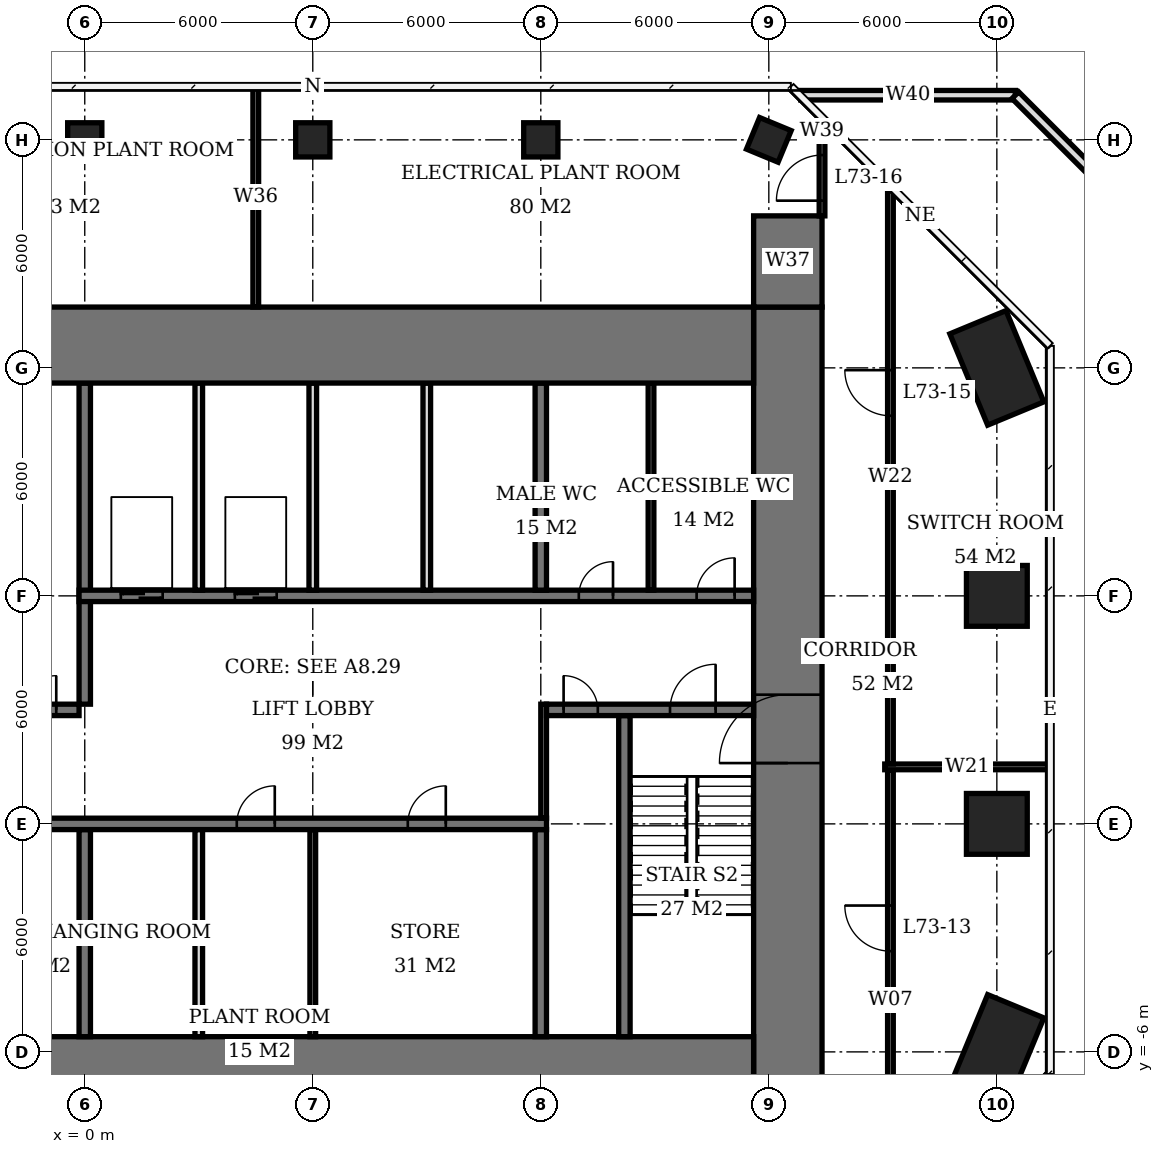
"""IFC4 building model, lengths in metres.
Left out: names, types, materials, properties, quantities, classifications, styles, units other than length and angle.
Written with IfcOpenShell. Run it as: python <this file> out.ifc"""

import sys

from ifc_helpers import new_model, si_unit, direction, frame, frame_2d, origin, origin_2d, place, context, subcontext, project, spatial, rectangle, extrude, element, fill, save


model = new_model("IFC4")
c1 = context("Model", 3, precision=1e-05, world=origin(), true_north=direction((0.0, 1.0)))
c2 = subcontext(c1, "Body", "Model", "MODEL_VIEW")
j1 = project(units=[si_unit("LENGTHUNIT", "METRE"), si_unit("PLANEANGLEUNIT", "RADIAN")], contexts=[c1])
p1 = place(None, origin())
s1 = spatial("IfcSite", under=j1, at=p1, CompositionType="ELEMENT")
p2 = place(p1, origin())
s2 = spatial("IfcBuilding", under=s1, at=p2, CompositionType="ELEMENT")
p3 = place(p2, frame((0.0, 0.0, 295.7)))
s3 = spatial("IfcBuildingStorey", under=s2, at=p3, CompositionType="ELEMENT", Elevation=295.7)
for number, where, z_axis, x_axis in (
    (1, (0.0, 18.0, 0.0), (0.0, 0.0, 1.0), (1.0, 0.0, 0.0)),
    (2, (6.0, 18.0, 0.0), (0.0, 0.0, 1.0), (1.0, 0.0, 0.0)),
    (3, (12.0, 18.0, 0.0), (0.0, 0.0, 1.0), (1.0, 0.0, 0.0)),
    (4, (18.0, 18.0, 0.0), (0.0, 0.0, 1.0), (0.924, -0.383, 0.0)),
):
    element("IfcColumn", number, at=place(p3, frame(where, z_axis=z_axis, x_axis=x_axis)), inside=s3, PredefinedType="COLUMN", context=c2, shape_type="SweptSolid", body=[
        extrude(rectangle(XDim=0.9, YDim=0.9, at=origin_2d()), origin(), (0.0, 0.0, 1.0), 5.0),
    ])
p4 = place(p3, frame((24.0, -6.0, 0.0), z_axis=(0.0, 0.0, 1.0), x_axis=(-0.382683432365, -0.923879532511, 0.0)))
e5 = element("IfcColumn", 5, at=p4, inside=s3, PredefinedType="COLUMN", context=c2, shape_type="SweptSolid", body=[
    extrude(rectangle(XDim=2.6, YDim=1.6, at=origin_2d()), origin(), (0.0, 0.0, 1.0), 5.0),
])
for number, where, z_axis, x_axis in (
    (6, (24.0, 0.0, 0.0), (0.0, 0.0, 1.0), (1.0, 0.0, 0.0)),
    (7, (24.0, 6.0, 0.0), (0.0, 0.0, 1.0), (1.0, 0.0, 0.0)),
):
    element("IfcColumn", number, at=place(p3, frame(where, z_axis=z_axis, x_axis=x_axis)), inside=s3, PredefinedType="COLUMN", context=c2, shape_type="SweptSolid", body=[
        extrude(rectangle(XDim=1.6, YDim=1.6, at=origin_2d()), origin(), (0.0, 0.0, 1.0), 5.0),
    ])
p5 = place(p3, frame((24.0, 12.0, 0.0), z_axis=(0.0, 0.0, 1.0), x_axis=(0.382683432365, -0.923879532511, 0.0)))
e8 = element("IfcColumn", 8, at=p5, inside=s3, PredefinedType="COLUMN", context=c2, shape_type="SweptSolid", body=[
    extrude(rectangle(XDim=2.6, YDim=1.6, at=origin_2d()), origin(), (0.0, 0.0, 1.0), 5.0),
])
for number, where, z_axis, x_axis in (
    (9, (-5.6, -6.6, 0.0), (0.0, 0.0, 1.0), (1.0, 0.0, 0.0)),
    (10, (-5.6, 12.6, 0.0), (0.0, 0.0, 1.0), (1.0, 0.0, 0.0)),
):
    element("IfcWall", number, at=place(p3, frame(where, z_axis=z_axis, x_axis=x_axis)), inside=s3, PredefinedType="SHEAR", context=c2, shape_type="SweptSolid", body=[
        extrude(rectangle(XDim=23.2, YDim=2.0, at=frame_2d((11.6, 0.0))), origin(), (0.0, 0.0, 1.0), 5.0),
    ])
p6 = place(p3, frame((18.5, -7.6, 0.0), z_axis=(0.0, 0.0, 1.0), x_axis=(0.0, 1.0, 0.0)))
e11 = element("IfcWall", 11, at=p6, inside=s3, PredefinedType="SHEAR", context=c2, shape_type="SweptSolid", body=[
    extrude(rectangle(XDim=21.2, YDim=1.8, at=frame_2d((10.6, 0.0))), origin(), (0.0, 0.0, 1.0), 5.0),
])
p7 = place(p6, frame((9.2, 0.0, 0.0)))
e12 = element("IfcOpeningElement", 12, at=p7, cuts=e11, PredefinedType="OPENING", context=c2, shape_type="SweptSolid", body=[
    extrude(rectangle(XDim=1.8, YDim=2.4, at=frame_2d((0.9, 1.2))), frame((0.0, 0.91, 0.0), z_axis=(0.0, -1.0, 0.0), x_axis=(1.0, 0.0, 0.0)), (0.0, 0.0, 1.0), 1.82),
])
p8 = place(p3, frame((18.5, 13.6, 0.0), z_axis=(0.0, 0.0, 1.0), x_axis=(0.0, 1.0, 0.0)))
e13 = element("IfcWall", 13, at=p8, inside=s3, PredefinedType="SHEAR", context=c2, shape_type="SweptSolid", body=[
    extrude(rectangle(XDim=2.4, YDim=1.8, at=frame_2d((1.2, 0.0))), origin(), (0.0, 0.0, 1.0), 5.0),
])
p9 = place(p3, frame((-5.6, 0.0, 0.0), z_axis=(0.0, 0.0, 1.0), x_axis=(1.0, 0.0, 0.0)))
e14 = element("IfcWall", 14, at=p9, inside=s3, PredefinedType="SHEAR", context=c2, shape_type="SweptSolid", body=[
    extrude(rectangle(XDim=17.75, YDim=0.3, at=frame_2d((8.875, 0.0))), origin(), (0.0, 0.0, 1.0), 5.0),
])
p10 = place(p9, frame((0.6, 0.0, 0.0)))
e15 = element("IfcOpeningElement", 15, at=p10, cuts=e14, PredefinedType="OPENING", context=c2, shape_type="SweptSolid", body=[
    extrude(rectangle(XDim=0.9, YDim=2.1, at=frame_2d((0.45, 1.05))), frame((0.0, 0.16, 0.0), z_axis=(0.0, -1.0, 0.0), x_axis=(1.0, 0.0, 0.0)), (0.0, 0.0, 1.0), 0.32),
])
p11 = place(p9, frame((3.7, 0.0, 0.0)))
e16 = element("IfcOpeningElement", 16, at=p11, cuts=e14, PredefinedType="OPENING", context=c2, shape_type="SweptSolid", body=[
    extrude(rectangle(XDim=0.9, YDim=2.1, at=frame_2d((0.45, 1.05))), frame((0.0, 0.16, 0.0), z_axis=(0.0, -1.0, 0.0), x_axis=(1.0, 0.0, 0.0)), (0.0, 0.0, 1.0), 0.32),
])
p12 = place(p9, frame((9.6, 0.0, 0.0)))
e17 = element("IfcOpeningElement", 17, at=p12, cuts=e14, PredefinedType="OPENING", context=c2, shape_type="SweptSolid", body=[
    extrude(rectangle(XDim=1.0, YDim=2.1, at=frame_2d((0.5, 1.05))), frame((0.0, 0.16, 0.0), z_axis=(0.0, -1.0, 0.0), x_axis=(1.0, 0.0, 0.0)), (0.0, 0.0, 1.0), 0.32),
])
p13 = place(p9, frame((14.1, 0.0, 0.0)))
e18 = element("IfcOpeningElement", 18, at=p13, cuts=e14, PredefinedType="OPENING", context=c2, shape_type="SweptSolid", body=[
    extrude(rectangle(XDim=1.0, YDim=2.1, at=frame_2d((0.5, 1.05))), frame((0.0, 0.16, 0.0), z_axis=(0.0, -1.0, 0.0), x_axis=(1.0, 0.0, 0.0)), (0.0, 0.0, 1.0), 0.32),
])
p14 = place(p3, frame((-5.6, 3.0, 0.0), z_axis=(0.0, 0.0, 1.0), x_axis=(1.0, 0.0, 0.0)))
e19 = element("IfcWall", 19, at=p14, inside=s3, PredefinedType="SHEAR", context=c2, shape_type="SweptSolid", body=[
    extrude(rectangle(XDim=5.45, YDim=0.3, at=frame_2d((2.725, 0.0))), origin(), (0.0, 0.0, 1.0), 5.0),
])
p15 = place(p14, frame((0.4, 0.0, 0.0)))
e20 = element("IfcOpeningElement", 20, at=p15, cuts=e19, PredefinedType="OPENING", context=c2, shape_type="SweptSolid", body=[
    extrude(rectangle(XDim=1.2, YDim=2.1, at=frame_2d((0.6, 1.05))), frame((0.0, 0.16, 0.0), z_axis=(0.0, -1.0, 0.0), x_axis=(1.0, 0.0, 0.0)), (0.0, 0.0, 1.0), 0.32),
])
p16 = place(p14, frame((3.95, 0.0, 0.0)))
e21 = element("IfcOpeningElement", 21, at=p16, cuts=e19, PredefinedType="OPENING", context=c2, shape_type="SweptSolid", body=[
    extrude(rectangle(XDim=0.9, YDim=2.1, at=frame_2d((0.45, 1.05))), frame((0.0, 0.16, 0.0), z_axis=(0.0, -1.0, 0.0), x_axis=(1.0, 0.0, 0.0)), (0.0, 0.0, 1.0), 0.32),
])
p17 = place(p3, frame((12.15, 3.0, 0.0), z_axis=(0.0, 0.0, 1.0), x_axis=(1.0, 0.0, 0.0)))
e22 = element("IfcWall", 22, at=p17, inside=s3, PredefinedType="SHEAR", context=c2, shape_type="SweptSolid", body=[
    extrude(rectangle(XDim=5.45, YDim=0.3, at=frame_2d((2.725, 0.0))), origin(), (0.0, 0.0, 1.0), 5.0),
])
p18 = place(p17, frame((3.25, 0.0, 0.0)))
e23 = element("IfcOpeningElement", 23, at=p18, cuts=e22, PredefinedType="OPENING", context=c2, shape_type="SweptSolid", body=[
    extrude(rectangle(XDim=1.2, YDim=2.1, at=frame_2d((0.6, 1.05))), frame((0.0, 0.16, 0.0), z_axis=(0.0, -1.0, 0.0), x_axis=(1.0, 0.0, 0.0)), (0.0, 0.0, 1.0), 0.32),
])
p19 = place(p17, frame((0.45, 0.0, 0.0)))
e24 = element("IfcOpeningElement", 24, at=p19, cuts=e22, PredefinedType="OPENING", context=c2, shape_type="SweptSolid", body=[
    extrude(rectangle(XDim=0.9, YDim=2.1, at=frame_2d((0.45, 1.05))), frame((0.0, 0.16, 0.0), z_axis=(0.0, -1.0, 0.0), x_axis=(1.0, 0.0, 0.0)), (0.0, 0.0, 1.0), 0.32),
])
p20 = place(p3, frame((-0.15, 6.0, 0.0), z_axis=(0.0, 0.0, 1.0), x_axis=(1.0, 0.0, 0.0)))
e25 = element("IfcWall", 25, at=p20, inside=s3, PredefinedType="SHEAR", context=c2, shape_type="SweptSolid", body=[
    extrude(rectangle(XDim=17.75, YDim=0.3, at=frame_2d((8.875, 0.0))), origin(), (0.0, 0.0, 1.0), 5.0),
])
p21 = place(p20, frame((13.15, 0.0, 0.0)))
e26 = element("IfcOpeningElement", 26, at=p21, cuts=e25, PredefinedType="OPENING", context=c2, shape_type="SweptSolid", body=[
    extrude(rectangle(XDim=0.9, YDim=2.1, at=frame_2d((0.45, 1.05))), frame((0.0, 0.16, 0.0), z_axis=(0.0, -1.0, 0.0), x_axis=(1.0, 0.0, 0.0)), (0.0, 0.0, 1.0), 0.32),
])
p22 = place(p20, frame((16.25, 0.0, 0.0)))
e27 = element("IfcOpeningElement", 27, at=p22, cuts=e25, PredefinedType="OPENING", context=c2, shape_type="SweptSolid", body=[
    extrude(rectangle(XDim=1.0, YDim=2.1, at=frame_2d((0.5, 1.05))), frame((0.0, 0.16, 0.0), z_axis=(0.0, -1.0, 0.0), x_axis=(1.0, 0.0, 0.0)), (0.0, 0.0, 1.0), 0.32),
])
p23 = place(p20, frame((1.1, 0.0, 0.0)))
e28 = element("IfcOpeningElement", 28, at=p23, cuts=e25, PredefinedType="OPENING", context=c2, shape_type="SweptSolid", body=[
    extrude(rectangle(XDim=1.1, YDim=2.1, at=frame_2d((0.55, 1.05))), frame((0.0, 0.16, 0.0), z_axis=(0.0, -1.0, 0.0), x_axis=(1.0, 0.0, 0.0)), (0.0, 0.0, 1.0), 0.32),
])
p24 = place(p20, frame((4.1, 0.0, 0.0)))
e29 = element("IfcOpeningElement", 29, at=p24, cuts=e25, PredefinedType="OPENING", context=c2, shape_type="SweptSolid", body=[
    extrude(rectangle(XDim=1.1, YDim=2.1, at=frame_2d((0.55, 1.05))), frame((0.0, 0.16, 0.0), z_axis=(0.0, -1.0, 0.0), x_axis=(1.0, 0.0, 0.0)), (0.0, 0.0, 1.0), 0.32),
])
p25 = place(p3, frame((0.0, -5.6, 0.0), z_axis=(0.0, 0.0, 1.0), x_axis=(0.0, 1.0, 0.0)))
e30 = element("IfcWall", 30, at=p25, inside=s3, PredefinedType="SHEAR", context=c2, shape_type="SweptSolid", body=[
    extrude(rectangle(XDim=5.45, YDim=0.3, at=frame_2d((2.725, 0.0))), origin(), (0.0, 0.0, 1.0), 5.0),
])
p26 = place(p3, frame((0.0, 3.15, 0.0), z_axis=(0.0, 0.0, 1.0), x_axis=(0.0, 1.0, 0.0)))
e31 = element("IfcWall", 31, at=p26, inside=s3, PredefinedType="SHEAR", context=c2, shape_type="SweptSolid", body=[
    extrude(rectangle(XDim=8.45, YDim=0.3, at=frame_2d((4.225, 0.0))), origin(), (0.0, 0.0, 1.0), 5.0),
])
for number, where, z_axis, x_axis in (
    (32, (12.0, -5.6, 0.0), (0.0, 0.0, 1.0), (0.0, 1.0, 0.0)),
    (33, (12.0, 6.15, 0.0), (0.0, 0.0, 1.0), (0.0, 1.0, 0.0)),
):
    element("IfcWall", number, at=place(p3, frame(where, z_axis=z_axis, x_axis=x_axis)), inside=s3, PredefinedType="SHEAR", context=c2, shape_type="SweptSolid", body=[
        extrude(rectangle(XDim=5.45, YDim=0.3, at=frame_2d((2.725, 0.0))), origin(), (0.0, 0.0, 1.0), 5.0),
    ])
p27 = place(p3, frame((14.2, -5.6, 0.0), z_axis=(0.0, 0.0, 1.0), x_axis=(0.0, 1.0, 0.0)))
e34 = element("IfcWall", 34, at=p27, inside=s3, PredefinedType="SHEAR", context=c2, shape_type="SweptSolid", body=[
    extrude(rectangle(XDim=8.45, YDim=0.3, at=frame_2d((4.225, 0.0))), origin(), (0.0, 0.0, 1.0), 5.0),
])
for number, where, z_axis, x_axis in (
    (35, (3.0, 6.15, 0.0), (0.0, 0.0, 1.0), (0.0, 1.0, 0.0)),
    (36, (6.0, 6.15, 0.0), (0.0, 0.0, 1.0), (0.0, 1.0, 0.0)),
    (37, (9.0, 6.15, 0.0), (0.0, 0.0, 1.0), (0.0, 1.0, 0.0)),
    (38, (3.0, -5.6, 0.0), (0.0, 0.0, 1.0), (0.0, 1.0, 0.0)),
):
    element("IfcWall", number, at=place(p3, frame(where, z_axis=z_axis, x_axis=x_axis)), inside=s3, PredefinedType="SOLIDWALL", context=c2, shape_type="SweptSolid", body=[
        extrude(rectangle(XDim=5.45, YDim=0.2, at=frame_2d((2.725, 0.0))), origin(), (0.0, 0.0, 1.0), 5.0),
    ])
p28 = place(p3, frame((24.487, 19.175, 0.0), z_axis=(0.0, 0.0, 1.0), x_axis=(0.707106781187, -0.707106781187, 0.0)))
e39 = element("IfcWall", 39, at=p28, inside=s3, PredefinedType="PARAPET", context=c2, shape_type="SweptSolid", body=[
    extrude(rectangle(XDim=9.458, YDim=0.25, at=frame_2d((4.729, 0.0))), origin(), (0.0, 0.0, 1.0), 1.1),
])
p29 = place(p3, frame((18.84, 19.175, 0.0), z_axis=(0.0, 0.0, 1.0), x_axis=(1.0, 0.0, 0.0)))
e40 = element("IfcWall", 40, at=p29, inside=s3, PredefinedType="PARAPET", context=c2, shape_type="SweptSolid", body=[
    extrude(rectangle(XDim=5.646, YDim=0.25, at=frame_2d((2.823, 0.0))), origin(), (0.0, 0.0, 1.0), 1.1),
])
p30 = place(p3, frame((14.9, 6.15, 0.0), z_axis=(0.0, 0.0, 1.0), x_axis=(0.0, 1.0, 0.0)))
e41 = element("IfcWall", 41, at=p30, inside=s3, PredefinedType="PLUMBINGWALL", context=c2, shape_type="SweptSolid", body=[
    extrude(rectangle(XDim=5.45, YDim=0.15, at=frame_2d((2.725, 0.0))), origin(), (0.0, 0.0, 1.0), 4.75),
])
p31 = place(p3, frame((6.0, -5.6, 0.0), z_axis=(0.0, 0.0, 1.0), x_axis=(0.0, 1.0, 0.0)))
e42 = element("IfcWall", 42, at=p31, inside=s3, PredefinedType="PARTITIONING", context=c2, shape_type="SweptSolid", body=[
    extrude(rectangle(XDim=5.45, YDim=0.15, at=frame_2d((2.725, 0.0))), origin(), (0.0, 0.0, 1.0), 4.75),
])
p32 = place(p3, frame((4.5, 13.6, 0.0), z_axis=(0.0, 0.0, 1.0), x_axis=(0.0, 1.0, 0.0)))
e43 = element("IfcWall", 43, at=p32, inside=s3, PredefinedType="PARTITIONING", context=c2, shape_type="SweptSolid", body=[
    extrude(rectangle(XDim=5.8, YDim=0.15, at=frame_2d((2.9, 0.0))), origin(), (0.0, 0.0, 1.0), 4.75),
])
p33 = place(p3, frame((19.4, 16.0, 0.0), z_axis=(0.0, 0.0, 1.0), x_axis=(0.0, 1.0, 0.0)))
e44 = element("IfcWall", 44, at=p33, inside=s3, PredefinedType="PARTITIONING", context=c2, shape_type="SweptSolid", body=[
    extrude(rectangle(XDim=2.489, YDim=0.15, at=frame_2d((1.245, 0.0))), origin(), (0.0, 0.0, 1.0), 4.75),
])
p34 = place(p33, frame((0.4, 0.0, 0.0)))
e45 = element("IfcOpeningElement", 45, at=p34, cuts=e44, PredefinedType="OPENING", context=c2, shape_type="SweptSolid", body=[
    extrude(rectangle(XDim=1.2, YDim=2.4, at=frame_2d((0.6, 1.2))), frame((0.0, 0.085, 0.0), z_axis=(0.0, -1.0, 0.0), x_axis=(1.0, 0.0, 0.0)), (0.0, 0.0, 1.0), 0.17),
])
p35 = place(p3, frame((21.2, -10.689, 0.0), z_axis=(0.0, 0.0, 1.0), x_axis=(0.0, 1.0, 0.0)))
e46 = element("IfcWall", 46, at=p35, inside=s3, PredefinedType="PARTITIONING", context=c2, shape_type="SweptSolid", body=[
    extrude(rectangle(XDim=12.114, YDim=0.15, at=frame_2d((6.057, 0.0))), origin(), (0.0, 0.0, 1.0), 4.75),
])
p36 = place(p35, frame((7.34, 0.0, 0.0)))
e47 = element("IfcOpeningElement", 47, at=p36, cuts=e46, PredefinedType="OPENING", context=c2, shape_type="SweptSolid", body=[
    extrude(rectangle(XDim=1.2, YDim=2.4, at=frame_2d((0.6, 1.2))), frame((0.0, 0.085, 0.0), z_axis=(0.0, -1.0, 0.0), x_axis=(1.0, 0.0, 0.0)), (0.0, 0.0, 1.0), 0.17),
])
p37 = place(p3, frame((21.2, 1.575, 0.0), z_axis=(0.0, 0.0, 1.0), x_axis=(0.0, 1.0, 0.0)))
e48 = element("IfcWall", 48, at=p37, inside=s3, PredefinedType="PARTITIONING", context=c2, shape_type="SweptSolid", body=[
    extrude(rectangle(XDim=15.114, YDim=0.15, at=frame_2d((7.557, 0.0))), origin(), (0.0, 0.0, 1.0), 4.75),
])
p38 = place(p37, frame((9.165, 0.0, 0.0)))
e49 = element("IfcOpeningElement", 49, at=p38, cuts=e48, PredefinedType="OPENING", context=c2, shape_type="SweptSolid", body=[
    extrude(rectangle(XDim=1.2, YDim=2.4, at=frame_2d((0.6, 1.2))), frame((0.0, 0.085, 0.0), z_axis=(0.0, -1.0, 0.0), x_axis=(1.0, 0.0, 0.0)), (0.0, 0.0, 1.0), 0.17),
])
p39 = place(p3, frame((21.05, 1.5, 0.0), z_axis=(0.0, 0.0, 1.0), x_axis=(1.0, 0.0, 0.0)))
e50 = element("IfcWall", 50, at=p39, inside=s3, PredefinedType="PARTITIONING", context=c2, shape_type="SweptSolid", body=[
    extrude(rectangle(XDim=4.35, YDim=0.15, at=frame_2d((2.175, 0.0))), origin(), (0.0, 0.0, 1.0), 4.75),
])
p40 = place(p3, frame((12.075, 0.15, 0.0), z_axis=(0.0, 0.0, 1.0), x_axis=(0.0, 1.0, 0.0)))
e51 = element("IfcWall", 51, at=p40, inside=s3, PredefinedType="PARTITIONING", context=c2, shape_type="SweptSolid", body=[
    extrude(rectangle(XDim=3.0, YDim=0.15, at=frame_2d((1.5, 0.0))), origin(), (0.0, 0.0, 1.0), 4.75),
])
p41 = place(p7, origin())
e52 = element("IfcDoor", 52, at=p41, inside=s3, OperationType="DOUBLE_DOOR_SINGLE_SWING", PredefinedType="DOOR", context=c2, shape_type="SweptSolid", body=[
    extrude(rectangle(XDim=1.8, YDim=2.4, at=frame_2d((0.9, 1.2))), frame((0.0, 0.025, 0.0), z_axis=(0.0, -1.0, 0.0), x_axis=(1.0, 0.0, 0.0)), (0.0, 0.0, 1.0), 0.05),
])
fill(e12, e52)
p42 = place(p16, origin())
e53 = element("IfcDoor", 53, at=p42, inside=s3, OperationType="SINGLE_SWING_RIGHT", PredefinedType="DOOR", context=c2, shape_type="SweptSolid", body=[
    extrude(rectangle(XDim=0.9, YDim=2.1, at=frame_2d((0.45, 1.05))), frame((0.0, 0.025, 0.0), z_axis=(0.0, -1.0, 0.0), x_axis=(1.0, 0.0, 0.0)), (0.0, 0.0, 1.0), 0.05),
])
fill(e21, e53)
p43 = place(p18, origin())
e54 = element("IfcDoor", 54, at=p43, inside=s3, OperationType="SINGLE_SWING_RIGHT", PredefinedType="DOOR", context=c2, shape_type="SweptSolid", body=[
    extrude(rectangle(XDim=1.2, YDim=2.1, at=frame_2d((0.6, 1.05))), frame((0.0, 0.025, 0.0), z_axis=(0.0, -1.0, 0.0), x_axis=(1.0, 0.0, 0.0)), (0.0, 0.0, 1.0), 0.05),
])
fill(e23, e54)
p44 = place(p19, origin())
e55 = element("IfcDoor", 55, at=p44, inside=s3, OperationType="SINGLE_SWING_LEFT", PredefinedType="DOOR", context=c2, shape_type="SweptSolid", body=[
    extrude(rectangle(XDim=0.9, YDim=2.1, at=frame_2d((0.45, 1.05))), frame((0.0, 0.025, 0.0), z_axis=(0.0, -1.0, 0.0), x_axis=(1.0, 0.0, 0.0)), (0.0, 0.0, 1.0), 0.05),
])
fill(e24, e55)
p45 = place(p21, origin())
e56 = element("IfcDoor", 56, at=p45, inside=s3, OperationType="SINGLE_SWING_RIGHT", PredefinedType="DOOR", context=c2, shape_type="SweptSolid", body=[
    extrude(rectangle(XDim=0.9, YDim=2.1, at=frame_2d((0.45, 1.05))), frame((0.0, 0.025, 0.0), z_axis=(0.0, -1.0, 0.0), x_axis=(1.0, 0.0, 0.0)), (0.0, 0.0, 1.0), 0.05),
])
fill(e26, e56)
p46 = place(p22, origin())
e57 = element("IfcDoor", 57, at=p46, inside=s3, OperationType="SINGLE_SWING_RIGHT", PredefinedType="DOOR", context=c2, shape_type="SweptSolid", body=[
    extrude(rectangle(XDim=1.0, YDim=2.1, at=frame_2d((0.5, 1.05))), frame((0.0, 0.025, 0.0), z_axis=(0.0, -1.0, 0.0), x_axis=(1.0, 0.0, 0.0)), (0.0, 0.0, 1.0), 0.05),
])
fill(e27, e57)
p47 = place(p12, origin())
e58 = element("IfcDoor", 58, at=p47, inside=s3, OperationType="SINGLE_SWING_RIGHT", PredefinedType="DOOR", context=c2, shape_type="SweptSolid", body=[
    extrude(rectangle(XDim=1.0, YDim=2.1, at=frame_2d((0.5, 1.05))), frame((0.0, 0.025, 0.0), z_axis=(0.0, -1.0, 0.0), x_axis=(1.0, 0.0, 0.0)), (0.0, 0.0, 1.0), 0.05),
])
fill(e17, e58)
p48 = place(p13, origin())
e59 = element("IfcDoor", 59, at=p48, inside=s3, OperationType="SINGLE_SWING_RIGHT", PredefinedType="DOOR", context=c2, shape_type="SweptSolid", body=[
    extrude(rectangle(XDim=1.0, YDim=2.1, at=frame_2d((0.5, 1.05))), frame((0.0, 0.025, 0.0), z_axis=(0.0, -1.0, 0.0), x_axis=(1.0, 0.0, 0.0)), (0.0, 0.0, 1.0), 0.05),
])
fill(e18, e59)
p49 = place(p23, origin())
e60 = element("IfcDoor", 60, at=p49, inside=s3, OperationType="DOUBLE_DOOR_SLIDING", PredefinedType="USERDEFINED", context=c2, shape_type="SweptSolid", body=[
    extrude(rectangle(XDim=1.1, YDim=2.1, at=frame_2d((0.55, 1.05))), frame((0.0, 0.025, 0.0), z_axis=(0.0, -1.0, 0.0), x_axis=(1.0, 0.0, 0.0)), (0.0, 0.0, 1.0), 0.05),
])
fill(e28, e60)
p50 = place(p24, origin())
e61 = element("IfcDoor", 61, at=p50, inside=s3, OperationType="DOUBLE_DOOR_SLIDING", PredefinedType="USERDEFINED", context=c2, shape_type="SweptSolid", body=[
    extrude(rectangle(XDim=1.1, YDim=2.1, at=frame_2d((0.55, 1.05))), frame((0.0, 0.025, 0.0), z_axis=(0.0, -1.0, 0.0), x_axis=(1.0, 0.0, 0.0)), (0.0, 0.0, 1.0), 0.05),
])
fill(e29, e61)
p51 = place(p36, origin())
e62 = element("IfcDoor", 62, at=p51, inside=s3, OperationType="SINGLE_SWING_RIGHT", PredefinedType="DOOR", context=c2, shape_type="SweptSolid", body=[
    extrude(rectangle(XDim=1.2, YDim=2.4, at=frame_2d((0.6, 1.2))), frame((0.0, 0.025, 0.0), z_axis=(0.0, -1.0, 0.0), x_axis=(1.0, 0.0, 0.0)), (0.0, 0.0, 1.0), 0.05),
])
fill(e47, e62)
p52 = place(p38, origin())
e63 = element("IfcDoor", 63, at=p52, inside=s3, OperationType="SINGLE_SWING_RIGHT", PredefinedType="DOOR", context=c2, shape_type="SweptSolid", body=[
    extrude(rectangle(XDim=1.2, YDim=2.4, at=frame_2d((0.6, 1.2))), frame((0.0, 0.025, 0.0), z_axis=(0.0, -1.0, 0.0), x_axis=(1.0, 0.0, 0.0)), (0.0, 0.0, 1.0), 0.05),
])
fill(e49, e63)
p53 = place(p34, origin())
e64 = element("IfcDoor", 64, at=p53, inside=s3, OperationType="SINGLE_SWING_LEFT", PredefinedType="DOOR", context=c2, shape_type="SweptSolid", body=[
    extrude(rectangle(XDim=1.2, YDim=2.4, at=frame_2d((0.6, 1.2))), frame((0.0, 0.025, 0.0), z_axis=(0.0, -1.0, 0.0), x_axis=(1.0, 0.0, 0.0)), (0.0, 0.0, 1.0), 0.05),
])
fill(e45, e64)
save(model, sys.argv[1])
